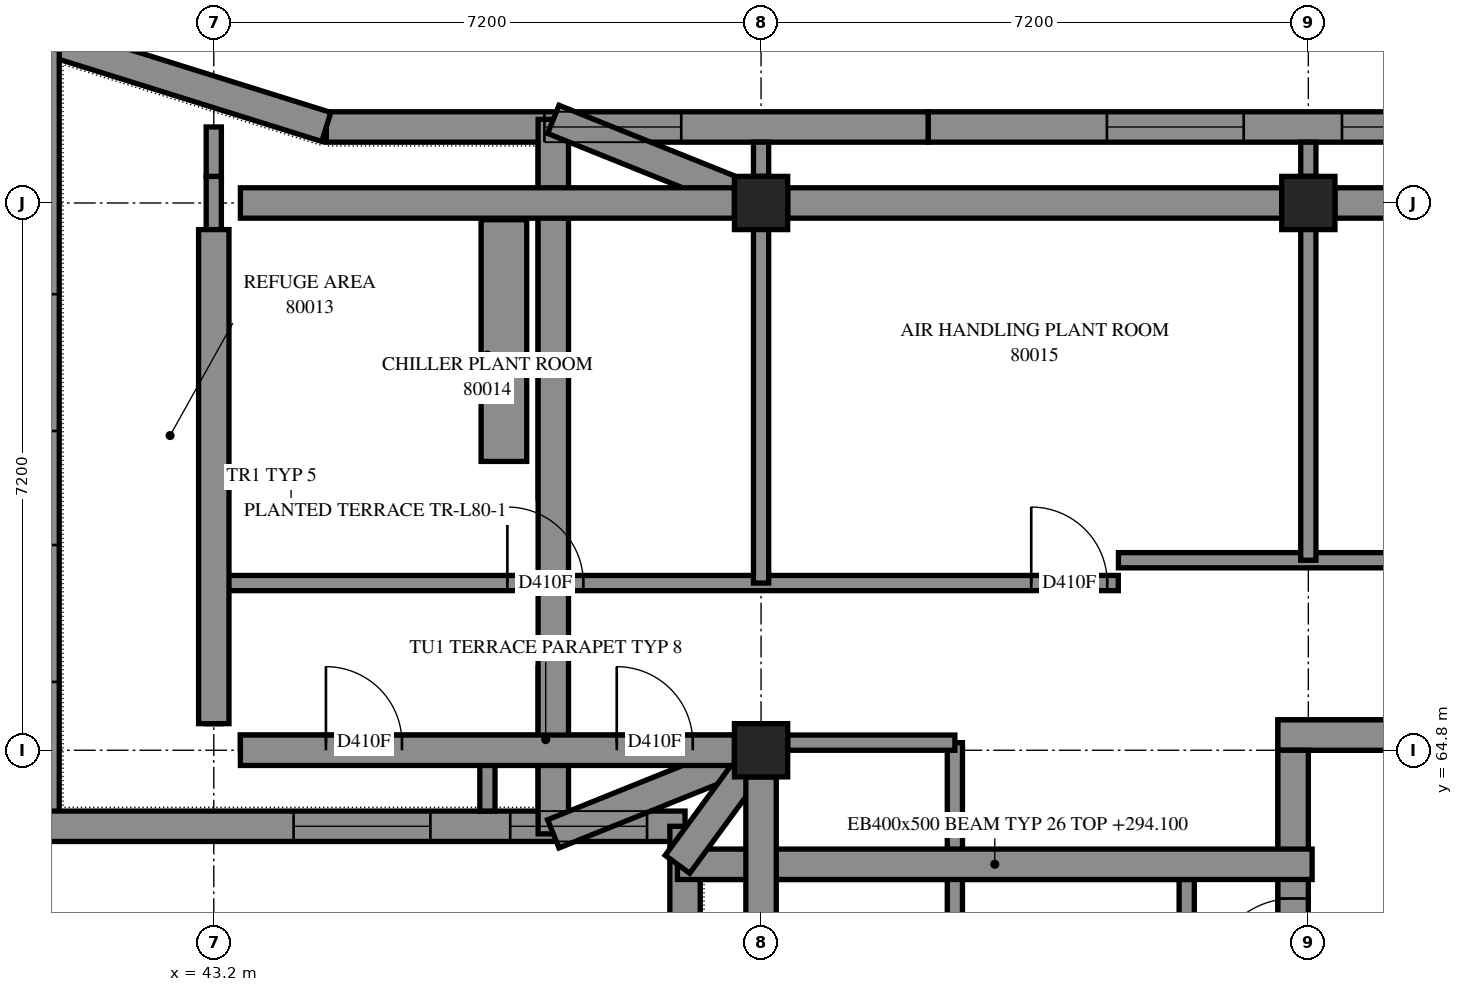
"""IFC4 building model, lengths in metres.
Left out: names, types, materials, properties, quantities, classifications, styles, units other than length and angle.
Written with IfcOpenShell. Run it as: python <this file> out.ifc"""

import sys

from ifc_helpers import new_model, si_unit, direction, frame, frame_2d, origin, origin_2d, place, context, subcontext, project, spatial, polyline, rectangle, outline, extrude, element, fill, save


model = new_model("IFC4")
c1 = context("Model", 3, precision=1e-05, world=origin(), true_north=direction((0.0, 1.0)))
c2 = subcontext(c1, "Body", "Model", "MODEL_VIEW")
j1 = project(units=[si_unit("LENGTHUNIT", "METRE"), si_unit("PLANEANGLEUNIT", "RADIAN")], contexts=[c1])
p1 = place(None, origin())
s1 = spatial("IfcSite", under=j1, at=p1, CompositionType="ELEMENT")
p2 = place(p1, origin())
s2 = spatial("IfcBuilding", under=s1, at=p2, CompositionType="ELEMENT")
p3 = place(p2, frame((0.0, 0.0, 294.4)))
s3 = spatial("IfcBuildingStorey", under=s2, at=p3, CompositionType="ELEMENT", Elevation=294.4)
for number, where, z_axis, x_axis in (
    (1, (50.4, 64.8, 0.0), (0.0, 0.0, 1.0), (1.0, 0.0, 0.0)),
    (2, (50.4, 72.0, 0.0), (0.0, 0.0, 1.0), (1.0, 0.0, 0.0)),
    (3, (57.6, 72.0, 0.0), (0.0, 0.0, 1.0), (1.0, 0.0, 0.0)),
):
    element("IfcColumn", number, at=place(p3, frame(where, z_axis=z_axis, x_axis=x_axis)), inside=s3, PredefinedType="COLUMN", context=c2, shape_type="SweptSolid", body=[
        extrude(rectangle(XDim=0.7, YDim=0.7, at=origin_2d()), origin(), (0.0, 0.0, 1.0), 3.5),
    ])
p4 = place(p3, frame((57.2, 65.0, -0.3), z_axis=(0.0, 0.0, 1.0), x_axis=(1.0, 0.0, 0.0)))
e4 = element("IfcWall", 4, at=p4, inside=s3, PredefinedType="SHEAR", context=c2, shape_type="SweptSolid", body=[
    extrude(outline(polyline([(0.0, 0.0), (15.2, 0.0), (15.2, 3.1), (0.0, 3.1), (0.0, 0.0)])), frame((0.0, 0.2, 0.0), z_axis=(0.0, -1.0, 0.0), x_axis=(1.0, 0.0, 0.0)), (0.0, 0.0, 1.0), 0.4),
])
p5 = place(p4, frame((10.4, 0.0, 0.3)))
e5 = element("IfcOpeningElement", 5, at=p5, cuts=e4, PredefinedType="OPENING", context=c2, shape_type="SweptSolid", body=[
    extrude(rectangle(XDim=0.8, YDim=2.1, at=frame_2d((0.4, 1.05))), frame((0.0, 0.21, 0.0), z_axis=(0.0, -1.0, 0.0), x_axis=(1.0, 0.0, 0.0)), (0.0, 0.0, 1.0), 0.42),
])
p6 = place(p3, frame((57.4, 50.4, -0.3), z_axis=(0.0, 0.0, 1.0), x_axis=(0.0, 1.0, 0.0)))
e6 = element("IfcWall", 6, at=p6, inside=s3, PredefinedType="SHEAR", context=c2, shape_type="SweptSolid", body=[
    extrude(outline(polyline([(0.0, 0.0), (14.4, 0.0), (14.4, 3.1), (0.0, 3.1), (0.0, 0.0)])), frame((0.0, 0.2, 0.0), z_axis=(0.0, -1.0, 0.0), x_axis=(1.0, 0.0, 0.0)), (0.0, 0.0, 1.0), 0.4),
])
p7 = place(p6, frame((11.35, 0.0, 0.3)))
e7 = element("IfcOpeningElement", 7, at=p7, cuts=e6, PredefinedType="OPENING", context=c2, shape_type="SweptSolid", body=[
    extrude(rectangle(XDim=1.1, YDim=2.1, at=frame_2d((0.55, 1.05))), frame((0.0, 0.21, 0.0), z_axis=(0.0, -1.0, 0.0), x_axis=(1.0, 0.0, 0.0)), (0.0, 0.0, 1.0), 0.42),
])
p8 = place(p3, frame((60.485, 73.0, 0.0), z_axis=(0.0, 0.0, 1.0), x_axis=(-1.0, 0.0, 0.0)))
e8 = element("IfcWall", 8, at=p8, inside=s3, PredefinedType="SOLIDWALL", context=c2, shape_type="SweptSolid", body=[
    extrude(outline(polyline([(0.0, -0.2), (7.887, -0.2), (7.887, 0.2), (0.0, 0.2), (0.0, -0.2)])), origin(), (0.0, 0.0, 1.0), 3.5),
])
p9 = place(p8, frame((0.643, 0.0, 0.7)))
e9 = element("IfcOpeningElement", 9, at=p9, cuts=e8, PredefinedType="OPENING", context=c2, shape_type="SweptSolid", body=[
    extrude(rectangle(XDim=1.8, YDim=2.2, at=frame_2d((0.9, 1.1))), frame((0.0, 0.21, 0.0), z_axis=(0.0, -1.0, 0.0), x_axis=(1.0, 0.0, 0.0)), (0.0, 0.0, 1.0), 0.42),
])
p10 = place(p8, frame((3.735, 0.0, 0.7)))
e10 = element("IfcOpeningElement", 10, at=p10, cuts=e8, PredefinedType="OPENING", context=c2, shape_type="SweptSolid", body=[
    extrude(rectangle(XDim=1.8, YDim=2.2, at=frame_2d((0.9, 1.1))), frame((0.0, 0.21, 0.0), z_axis=(0.0, -1.0, 0.0), x_axis=(1.0, 0.0, 0.0)), (0.0, 0.0, 1.0), 0.42),
])
p11 = place(p3, frame((52.598, 73.0, 0.0), z_axis=(0.0, 0.0, 1.0), x_axis=(-1.0, 0.0, 0.0)))
e11 = element("IfcWall", 11, at=p11, inside=s3, PredefinedType="SOLIDWALL", context=c2, shape_type="SweptSolid", body=[
    extrude(outline(polyline([(0.0, -0.2), (7.887, -0.2), (7.948, 0.2), (0.0, 0.2), (0.0, -0.2)])), origin(), (0.0, 0.0, 1.0), 3.5),
])
p12 = place(p11, frame((3.248, 0.0, 0.7)))
e12 = element("IfcOpeningElement", 12, at=p12, cuts=e11, PredefinedType="OPENING", context=c2, shape_type="SweptSolid", body=[
    extrude(rectangle(XDim=1.8, YDim=2.2, at=frame_2d((0.9, 1.1))), frame((0.0, 0.21, 0.0), z_axis=(0.0, -1.0, 0.0), x_axis=(1.0, 0.0, 0.0)), (0.0, 0.0, 1.0), 0.42),
])
p13 = place(p3, frame((44.68, 73.0, 0.0), z_axis=(0.0, 0.0, 1.0), x_axis=(-0.9544392625, 0.2984052516, 0.0)))
e13 = element("IfcWall", 13, at=p13, inside=s3, PredefinedType="SOLIDWALL", context=c2, shape_type="SweptSolid", body=[
    extrude(outline(polyline([(0.03, -0.2), (4.162, -0.2), (3.618, 0.2), (-0.03, 0.2), (0.03, -0.2)])), origin(), (0.0, 0.0, 1.0), 3.5),
])
p14 = place(p3, frame((40.967, 74.161, 0.0), z_axis=(0.0, 0.0, 1.0), x_axis=(0.0, -1.0, 0.0)))
e14 = element("IfcWall", 14, at=p14, inside=s3, PredefinedType="SOLIDWALL", context=c2, shape_type="SweptSolid", body=[
    extrude(outline(polyline([(-0.272, -0.2), (10.561, -0.2), (10.161, 0.2), (0.272, 0.2), (-0.272, -0.2)])), origin(), (0.0, 0.0, 1.0), 3.5),
])
p15 = place(p14, frame((3.361, 0.0, 0.7)))
e15 = element("IfcOpeningElement", 15, at=p15, cuts=e14, PredefinedType="OPENING", context=c2, shape_type="SweptSolid", body=[
    extrude(rectangle(XDim=1.8, YDim=2.2, at=frame_2d((0.9, 1.1))), frame((0.0, 0.21, 0.0), z_axis=(0.0, -1.0, 0.0), x_axis=(1.0, 0.0, 0.0)), (0.0, 0.0, 1.0), 0.42),
])
p16 = place(p14, frame((6.661, 0.0, 0.7)))
e16 = element("IfcOpeningElement", 16, at=p16, cuts=e14, PredefinedType="OPENING", context=c2, shape_type="SweptSolid", body=[
    extrude(rectangle(XDim=1.8, YDim=2.2, at=frame_2d((0.9, 1.1))), frame((0.0, 0.21, 0.0), z_axis=(0.0, -1.0, 0.0), x_axis=(1.0, 0.0, 0.0)), (0.0, 0.0, 1.0), 0.42),
])
p17 = place(p3, frame((40.967, 63.8, 0.0), z_axis=(0.0, 0.0, 1.0), x_axis=(1.0, 0.0, 0.0)))
e17 = element("IfcWall", 17, at=p17, inside=s3, PredefinedType="SOLIDWALL", context=c2, shape_type="SweptSolid", body=[
    extrude(outline(polyline([(-0.2, -0.2), (8.233, -0.2), (8.633, 0.2), (0.2, 0.2), (-0.2, -0.2)])), origin(), (0.0, 0.0, 1.0), 3.5),
])
p18 = place(p17, frame((3.283, 0.0, 0.7)))
e18 = element("IfcOpeningElement", 18, at=p18, cuts=e17, PredefinedType="OPENING", context=c2, shape_type="SweptSolid", body=[
    extrude(rectangle(XDim=1.8, YDim=2.2, at=frame_2d((0.9, 1.1))), frame((0.0, 0.21, 0.0), z_axis=(0.0, -1.0, 0.0), x_axis=(1.0, 0.0, 0.0)), (0.0, 0.0, 1.0), 0.42),
])
p19 = place(p17, frame((6.133, 0.0, 0.7)))
e19 = element("IfcOpeningElement", 19, at=p19, cuts=e17, PredefinedType="OPENING", context=c2, shape_type="SweptSolid", body=[
    extrude(rectangle(XDim=1.8, YDim=2.2, at=frame_2d((0.9, 1.1))), frame((0.0, 0.21, 0.0), z_axis=(0.0, -1.0, 0.0), x_axis=(1.0, 0.0, 0.0)), (0.0, 0.0, 1.0), 0.42),
])
p20 = place(p3, frame((49.4, 63.8, 0.0), z_axis=(0.0, 0.0, 1.0), x_axis=(0.0, -1.0, 0.0)))
e20 = element("IfcWall", 20, at=p20, inside=s3, PredefinedType="SOLIDWALL", context=c2, shape_type="SweptSolid", body=[
    extrude(outline(polyline([(0.2, -0.2), (7.4, -0.2), (7.0, 0.2), (-0.2, 0.2), (0.2, -0.2)])), origin(), (0.0, 0.0, 1.0), 3.5),
])
p21 = place(p20, frame((3.75, 0.0, 0.7)))
e21 = element("IfcOpeningElement", 21, at=p21, cuts=e20, PredefinedType="OPENING", context=c2, shape_type="SweptSolid", body=[
    extrude(rectangle(XDim=1.8, YDim=2.2, at=frame_2d((0.9, 1.1))), frame((0.0, 0.21, 0.0), z_axis=(0.0, -1.0, 0.0), x_axis=(1.0, 0.0, 0.0)), (0.0, 0.0, 1.0), 0.42),
])
p22 = place(p20, frame((1.725, 0.0, 0.7)))
e22 = element("IfcOpeningElement", 22, at=p22, cuts=e20, PredefinedType="OPENING", context=c2, shape_type="SweptSolid", body=[
    extrude(rectangle(XDim=1.8, YDim=2.2, at=frame_2d((0.9, 1.1))), frame((0.0, 0.21, 0.0), z_axis=(0.0, -1.0, 0.0), x_axis=(1.0, 0.0, 0.0)), (0.0, 0.0, 1.0), 0.42),
])
p23 = place(p3, frame((56.0, 56.8, 0.0), z_axis=(0.0, 0.0, 1.0), x_axis=(0.0, 1.0, 0.0)))
e23 = element("IfcWall", 23, at=p23, inside=s3, PredefinedType="PARAPET", context=c2, shape_type="SweptSolid", body=[
    extrude(outline(polyline([(0.0, -0.1), (6.5, -0.1), (6.3, 0.1), (0.0, 0.1), (0.0, -0.1)])), origin(), (0.0, 0.0, 1.0), 0.25),
])
p24 = place(p3, frame((56.0, 63.2, 0.0), z_axis=(0.0, 0.0, 1.0), x_axis=(-1.0, 0.0, 0.0)))
e24 = element("IfcWall", 24, at=p24, inside=s3, PredefinedType="PARAPET", context=c2, shape_type="SweptSolid", body=[
    extrude(outline(polyline([(-0.1, -0.1), (6.4, -0.1), (6.4, 0.1), (0.1, 0.1), (-0.1, -0.1)])), origin(), (0.0, 0.0, 1.0), 0.25),
])
p25 = place(p3, frame((55.102, 67.3, 0.0), z_axis=(0.0, 0.0, 1.0), x_axis=(1.0, 0.0, 0.0)))
e25 = element("IfcWall", 25, at=p25, inside=s3, PredefinedType="PARTITIONING", context=c2, shape_type="SweptSolid", body=[
    extrude(rectangle(XDim=19.398, YDim=0.2, at=frame_2d((9.699, 0.0))), origin(), (0.0, 0.0, 1.0), 3.5),
])
p26 = place(p25, frame((6.361, 0.0, 0.0)))
e26 = element("IfcOpeningElement", 26, at=p26, cuts=e25, PredefinedType="OPENING", context=c2, shape_type="SweptSolid", body=[
    extrude(rectangle(XDim=1.0, YDim=2.1, at=frame_2d((0.5, 1.05))), frame((0.0, 0.11, 0.0), z_axis=(0.0, -1.0, 0.0), x_axis=(1.0, 0.0, 0.0)), (0.0, 0.0, 1.0), 0.22),
])
p27 = place(p25, frame((13.56, 0.0, 0.0)))
e27 = element("IfcOpeningElement", 27, at=p27, cuts=e25, PredefinedType="OPENING", context=c2, shape_type="SweptSolid", body=[
    extrude(rectangle(XDim=1.0, YDim=2.1, at=frame_2d((0.5, 1.05))), frame((0.0, 0.11, 0.0), z_axis=(0.0, -1.0, 0.0), x_axis=(1.0, 0.0, 0.0)), (0.0, 0.0, 1.0), 0.22),
])
p28 = place(p3, frame((43.2, 67.0, 0.0), z_axis=(0.0, 0.0, 1.0), x_axis=(1.0, 0.0, 0.0)))
e28 = element("IfcWall", 28, at=p28, inside=s3, PredefinedType="PARTITIONING", context=c2, shape_type="SweptSolid", body=[
    extrude(rectangle(XDim=11.9, YDim=0.2, at=frame_2d((5.95, 0.0))), origin(), (0.0, 0.0, 1.0), 3.5),
])
p29 = place(p28, frame((3.862, 0.0, 0.0)))
e29 = element("IfcOpeningElement", 29, at=p29, cuts=e28, PredefinedType="OPENING", context=c2, shape_type="SweptSolid", body=[
    extrude(rectangle(XDim=1.0, YDim=2.1, at=frame_2d((0.5, 1.05))), frame((0.0, 0.11, 0.0), z_axis=(0.0, -1.0, 0.0), x_axis=(1.0, 0.0, 0.0)), (0.0, 0.0, 1.0), 0.22),
])
p30 = place(p28, frame((10.755, 0.0, 0.0)))
e30 = element("IfcOpeningElement", 30, at=p30, cuts=e28, PredefinedType="OPENING", context=c2, shape_type="SweptSolid", body=[
    extrude(rectangle(XDim=1.0, YDim=2.1, at=frame_2d((0.5, 1.05))), frame((0.0, 0.11, 0.0), z_axis=(0.0, -1.0, 0.0), x_axis=(1.0, 0.0, 0.0)), (0.0, 0.0, 1.0), 0.22),
])
p31 = place(p3, frame((43.55, 64.9, 0.0), z_axis=(0.0, 0.0, 1.0), x_axis=(1.0, 0.0, 0.0)))
e31 = element("IfcWall", 31, at=p31, inside=s3, PredefinedType="PARTITIONING", context=c2, shape_type="SweptSolid", body=[
    extrude(rectangle(XDim=7.2, YDim=0.2, at=frame_2d((3.6, 0.0))), origin(), (0.0, 0.0, 1.0), 3.5),
])
p32 = place(p31, frame((1.125, 0.0, 0.0)))
e32 = element("IfcOpeningElement", 32, at=p32, cuts=e31, PredefinedType="OPENING", context=c2, shape_type="SweptSolid", body=[
    extrude(rectangle(XDim=1.0, YDim=2.1, at=frame_2d((0.5, 1.05))), frame((0.0, 0.11, 0.0), z_axis=(0.0, -1.0, 0.0), x_axis=(1.0, 0.0, 0.0)), (0.0, 0.0, 1.0), 0.22),
])
p33 = place(p31, frame((4.952, 0.0, 0.0)))
e33 = element("IfcOpeningElement", 33, at=p33, cuts=e31, PredefinedType="OPENING", context=c2, shape_type="SweptSolid", body=[
    extrude(rectangle(XDim=1.0, YDim=2.1, at=frame_2d((0.5, 1.05))), frame((0.0, 0.11, 0.0), z_axis=(0.0, -1.0, 0.0), x_axis=(1.0, 0.0, 0.0)), (0.0, 0.0, 1.0), 0.22),
])
p34 = place(p3, frame((43.2, 67.0, 0.0), z_axis=(0.0, 0.0, 1.0), x_axis=(0.0, 1.0, 0.0)))
e34 = element("IfcWall", 34, at=p34, inside=s3, PredefinedType="PARTITIONING", context=c2, shape_type="SweptSolid", body=[
    extrude(rectangle(XDim=5.35, YDim=0.2, at=frame_2d((2.675, 0.0))), origin(), (0.0, 0.0, 1.0), 3.5),
])
p35 = place(p3, frame((50.4, 67.0, 0.0), z_axis=(0.0, 0.0, 1.0), x_axis=(0.0, 1.0, 0.0)))
e35 = element("IfcWall", 35, at=p35, inside=s3, PredefinedType="PARTITIONING", context=c2, shape_type="SweptSolid", body=[
    extrude(rectangle(XDim=5.35, YDim=0.2, at=frame_2d((2.675, 0.0))), origin(), (0.0, 0.0, 1.0), 3.0),
])
p36 = place(p3, frame((57.6, 67.3, 0.0), z_axis=(0.0, 0.0, 1.0), x_axis=(0.0, 1.0, 0.0)))
e36 = element("IfcWall", 36, at=p36, inside=s3, PredefinedType="PARTITIONING", context=c2, shape_type="SweptSolid", body=[
    extrude(rectangle(XDim=5.05, YDim=0.2, at=frame_2d((2.525, 0.0))), origin(), (0.0, 0.0, 1.0), 3.5),
])
p37 = place(p3, frame((52.95, 62.252, 0.0), z_axis=(0.0, 0.0, 1.0), x_axis=(0.0, 1.0, 0.0)))
e37 = element("IfcWall", 37, at=p37, inside=s3, PredefinedType="PARTITIONING", context=c2, shape_type="SweptSolid", body=[
    extrude(rectangle(XDim=2.648, YDim=0.2, at=frame_2d((1.324, 0.0))), origin(), (0.0, 0.0, 1.0), 3.5),
])
p38 = place(p3, frame((50.75, 64.9, 0.0), z_axis=(0.0, 0.0, 1.0), x_axis=(1.0, 0.0, 0.0)))
e38 = element("IfcWall", 38, at=p38, inside=s3, PredefinedType="PARTITIONING", context=c2, shape_type="SweptSolid", body=[
    extrude(rectangle(XDim=2.2, YDim=0.2, at=frame_2d((1.1, 0.0))), origin(), (0.0, 0.0, 1.0), 3.5),
])
p39 = place(p3, frame((43.2, 65.15, 0.0), z_axis=(0.0, 0.0, 1.0), x_axis=(0.0, 1.0, 0.0)))
e39 = element("IfcWall", 39, at=p39, inside=s3, PredefinedType="PARTITIONING", context=c2, shape_type="SweptSolid", body=[
    extrude(rectangle(XDim=1.85, YDim=0.2, at=frame_2d((0.925, 0.0))), origin(), (0.0, 0.0, 1.0), 3.5),
])
p40 = place(p3, frame((43.2, 72.35, 0.0), z_axis=(0.0, 0.0, 1.0), x_axis=(0.0, 1.0, 0.0)))
e40 = element("IfcWall", 40, at=p40, inside=s3, PredefinedType="PARTITIONING", context=c2, shape_type="SweptSolid", body=[
    extrude(rectangle(XDim=0.65, YDim=0.2, at=frame_2d((0.325, 0.0))), origin(), (0.0, 0.0, 1.0), 3.5),
])
p41 = place(p3, frame((47.567, 64.0, 0.0), z_axis=(0.0, 0.0, 1.0), x_axis=(0.0, 1.0, 0.0)))
e41 = element("IfcWall", 41, at=p41, inside=s3, PredefinedType="PARAPET", context=c2, shape_type="SweptSolid", body=[
    extrude(outline(polyline([(0.0, -0.1), (1.88, -0.1), (1.88, 0.1), (0.0, 0.1), (0.0, -0.1)])), origin(), (0.0, 0.0, 1.0), 0.25),
])
p42 = place(p3, frame((47.567, 68.12, 0.0), z_axis=(0.0, 0.0, 1.0), x_axis=(0.0, 1.0, 0.0)))
e42 = element("IfcWall", 42, at=p42, inside=s3, PredefinedType="PARAPET", context=c2, shape_type="SweptSolid", body=[
    extrude(outline(polyline([(0.0, -0.1), (4.68, -0.1), (4.68, 0.1), (0.0, 0.1), (0.0, -0.1)])), origin(), (0.0, 0.0, 1.0), 0.25),
])
p43 = place(p3, frame((47.017, 68.6, 0.0), z_axis=(0.0, 0.0, 1.0), x_axis=(0.0, 1.0, 0.0)))
e43 = element("IfcWall", 43, at=p43, inside=s3, PredefinedType="SOLIDWALL", context=c2, shape_type="SweptSolid", body=[
    extrude(outline(polyline([(0.0, -0.3), (3.18, -0.3), (3.18, 0.3), (0.0, 0.3), (0.0, -0.3)])), origin(), (0.0, 0.0, 1.0), 0.65),
])
p44 = place(p3, frame((46.8, 64.0, 0.0), z_axis=(0.0, 0.0, 1.0), x_axis=(0.0, 1.0, 0.0)))
e44 = element("IfcWall", 44, at=p44, inside=s3, PredefinedType="PARTITIONING", context=c2, shape_type="SweptSolid", body=[
    extrude(outline(polyline([(0.0, -0.1), (0.9, -0.1), (0.9, 0.1), (0.0, 0.1), (0.0, -0.1)])), origin(), (0.0, 0.0, 1.0), 3.5),
])
for number, where, z_axis, x_axis in (
    (45, (50.4, 72.35, 0.0), (0.0, 0.0, 1.0), (0.0, 1.0, 0.0)),
    (46, (57.6, 72.35, 0.0), (0.0, 0.0, 1.0), (0.0, 1.0, 0.0)),
):
    element("IfcWall", number, at=place(p3, frame(where, z_axis=z_axis, x_axis=x_axis)), inside=s3, PredefinedType="PARTITIONING", context=c2, shape_type="SweptSolid", body=[
        extrude(outline(polyline([(0.0, -0.1), (0.45, -0.1), (0.45, 0.1), (0.0, 0.1), (0.0, -0.1)])), origin(), (0.0, 0.0, 1.0), 3.5),
    ])
p45 = place(p9, origin())
e47 = element("IfcWindow", 47, at=p45, inside=s3, PartitioningType="SINGLE_PANEL", PredefinedType="WINDOW", context=c2, shape_type="SweptSolid", body=[
    extrude(rectangle(XDim=1.8, YDim=2.2, at=frame_2d((0.9, 1.1))), frame((0.0, 0.08, 0.0), z_axis=(0.0, -1.0, 0.0), x_axis=(1.0, 0.0, 0.0)), (0.0, 0.0, 1.0), 0.06),
])
fill(e9, e47)
p46 = place(p10, origin())
e48 = element("IfcWindow", 48, at=p46, inside=s3, PartitioningType="SINGLE_PANEL", PredefinedType="WINDOW", context=c2, shape_type="SweptSolid", body=[
    extrude(rectangle(XDim=1.8, YDim=2.2, at=frame_2d((0.9, 1.1))), frame((0.0, 0.08, 0.0), z_axis=(0.0, -1.0, 0.0), x_axis=(1.0, 0.0, 0.0)), (0.0, 0.0, 1.0), 0.06),
])
fill(e10, e48)
p47 = place(p12, origin())
e49 = element("IfcWindow", 49, at=p47, inside=s3, PartitioningType="SINGLE_PANEL", PredefinedType="WINDOW", context=c2, shape_type="SweptSolid", body=[
    extrude(rectangle(XDim=1.8, YDim=2.2, at=frame_2d((0.9, 1.1))), frame((0.0, 0.08, 0.0), z_axis=(0.0, -1.0, 0.0), x_axis=(1.0, 0.0, 0.0)), (0.0, 0.0, 1.0), 0.06),
])
fill(e12, e49)
p48 = place(p18, origin())
e50 = element("IfcWindow", 50, at=p48, inside=s3, PartitioningType="SINGLE_PANEL", PredefinedType="WINDOW", context=c2, shape_type="SweptSolid", body=[
    extrude(rectangle(XDim=1.8, YDim=2.2, at=frame_2d((0.9, 1.1))), frame((0.0, 0.08, 0.0), z_axis=(0.0, -1.0, 0.0), x_axis=(1.0, 0.0, 0.0)), (0.0, 0.0, 1.0), 0.06),
])
fill(e18, e50)
p49 = place(p19, origin())
e51 = element("IfcWindow", 51, at=p49, inside=s3, PartitioningType="SINGLE_PANEL", PredefinedType="WINDOW", context=c2, shape_type="SweptSolid", body=[
    extrude(rectangle(XDim=1.8, YDim=2.2, at=frame_2d((0.9, 1.1))), frame((0.0, 0.08, 0.0), z_axis=(0.0, -1.0, 0.0), x_axis=(1.0, 0.0, 0.0)), (0.0, 0.0, 1.0), 0.06),
])
fill(e19, e51)
p50 = place(p7, origin())
e52 = element("IfcDoor", 52, at=p50, inside=s3, OperationType="SINGLE_SWING_LEFT", PredefinedType="DOOR", context=c2, shape_type="SweptSolid", body=[
    extrude(rectangle(XDim=1.1, YDim=2.1, at=frame_2d((0.55, 1.05))), frame((0.0, 0.025, 0.0), z_axis=(0.0, -1.0, 0.0), x_axis=(1.0, 0.0, 0.0)), (0.0, 0.0, 1.0), 0.05),
])
fill(e7, e52)
p51 = place(p32, origin())
e53 = element("IfcDoor", 53, at=p51, inside=s3, OperationType="SINGLE_SWING_RIGHT", PredefinedType="DOOR", context=c2, shape_type="SweptSolid", body=[
    extrude(rectangle(XDim=1.0, YDim=2.1, at=frame_2d((0.5, 1.05))), frame((0.0, 0.025, 0.0), z_axis=(0.0, -1.0, 0.0), x_axis=(1.0, 0.0, 0.0)), (0.0, 0.0, 1.0), 0.05),
])
fill(e32, e53)
p52 = place(p29, origin())
e54 = element("IfcDoor", 54, at=p52, inside=s3, OperationType="SINGLE_SWING_RIGHT", PredefinedType="DOOR", context=c2, shape_type="SweptSolid", body=[
    extrude(rectangle(XDim=1.0, YDim=2.1, at=frame_2d((0.5, 1.05))), frame((0.0, 0.025, 0.0), z_axis=(0.0, -1.0, 0.0), x_axis=(1.0, 0.0, 0.0)), (0.0, 0.0, 1.0), 0.05),
])
fill(e29, e54)
p53 = place(p30, origin())
e55 = element("IfcDoor", 55, at=p53, inside=s3, OperationType="SINGLE_SWING_RIGHT", PredefinedType="DOOR", context=c2, shape_type="SweptSolid", body=[
    extrude(rectangle(XDim=1.0, YDim=2.1, at=frame_2d((0.5, 1.05))), frame((0.0, 0.025, 0.0), z_axis=(0.0, -1.0, 0.0), x_axis=(1.0, 0.0, 0.0)), (0.0, 0.0, 1.0), 0.05),
])
fill(e30, e55)
p54 = place(p33, origin())
e56 = element("IfcDoor", 56, at=p54, inside=s3, OperationType="SINGLE_SWING_RIGHT", PredefinedType="DOOR", context=c2, shape_type="SweptSolid", body=[
    extrude(rectangle(XDim=1.0, YDim=2.1, at=frame_2d((0.5, 1.05))), frame((0.0, 0.025, 0.0), z_axis=(0.0, -1.0, 0.0), x_axis=(1.0, 0.0, 0.0)), (0.0, 0.0, 1.0), 0.05),
])
fill(e33, e56)
save(model, sys.argv[1])
